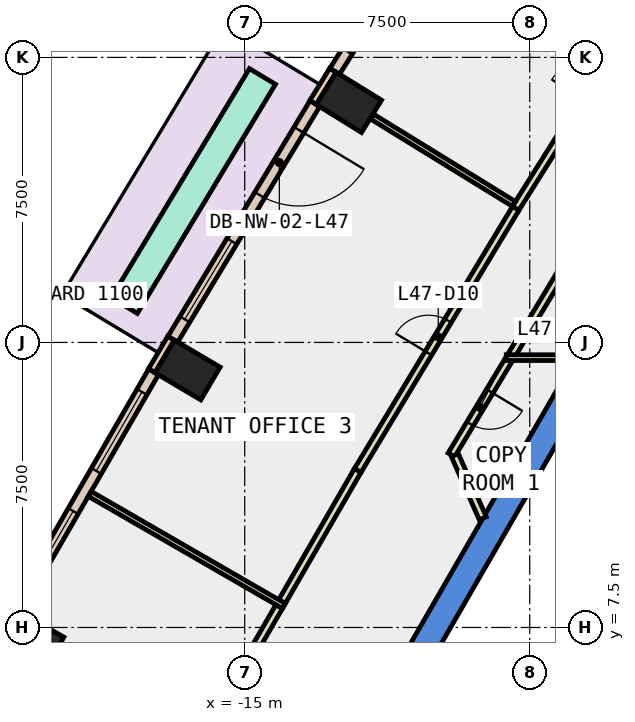
"""IFC4 building model, lengths in metres.
Left out: names, types, materials, properties, quantities, classifications, styles, units other than length and angle.
Written with IfcOpenShell. Run it as: python <this file> out.ifc"""

import sys

from ifc_helpers import new_model, si_unit, direction, frame, frame_2d, origin, origin_2d, place, context, subcontext, project, spatial, polyline, rectangle, outline, extrude, element, fill, save


model = new_model("IFC4")
c1 = context("Model", 3, precision=1e-05, world=origin(), true_north=direction((0.0, 1.0)))
c2 = subcontext(c1, "Body", "Model", "MODEL_VIEW")
j1 = project(units=[si_unit("LENGTHUNIT", "METRE"), si_unit("PLANEANGLEUNIT", "RADIAN")], contexts=[c1])
p1 = place(None, origin())
s1 = spatial("IfcSite", under=j1, at=p1, CompositionType="ELEMENT")
p2 = place(p1, origin())
s2 = spatial("IfcBuilding", under=s1, at=p2, CompositionType="ELEMENT")
p3 = place(p2, frame((0.0, 0.0, 210.8)))
s3 = spatial("IfcBuildingStorey", under=s2, at=p3, CompositionType="ELEMENT", Elevation=210.8)
for number, where, z_axis, x_axis in (
    (1, (-12.259, 21.317, -0.4), (0.0, 0.0, 1.0), (0.525, 0.851, 0.0)),
    (2, (-16.504, 14.275, -0.4), (0.0, 0.0, 1.0), (0.509, 0.861, 0.0)),
    (3, (-20.615, 7.155, -0.4), (0.0, 0.0, 1.0), (0.491, 0.871, 0.0)),
):
    element("IfcColumn", number, at=place(p3, frame(where, z_axis=z_axis, x_axis=x_axis)), inside=s3, PredefinedType="COLUMN", context=c2, shape_type="SweptSolid", body=[
        extrude(rectangle(XDim=1.0, YDim=1.4, at=origin_2d()), origin(), (0.0, 0.0, 1.0), 4.2),
    ])
p4 = place(p3, frame((0.0, 0.0, -0.4)))
e4 = element("IfcWall", 4, at=p4, inside=s3, PredefinedType="SHEAR", context=c2, shape_type="SweptSolid", body=[
    extrude(outline(polyline([(-11.834, 5.002), (-11.228, 4.652), (-6.235, 13.3), (-6.64, 14.0), (-11.834, 5.002)])), origin(), (0.0, 0.0, 1.0), 4.2),
])
p5 = place(p3, frame((-12.677, 22.163, 0.0), z_axis=(0.0, 0.0, 1.0), x_axis=(-0.525648735675, -0.850701714282, 0.0)))
e5 = element("IfcWall", 5, at=p5, inside=s3, PredefinedType="STANDARD", context=c2, shape_type="SweptSolid", body=[
    extrude(rectangle(XDim=1.0, YDim=0.2, at=frame_2d((0.5, 0.0))), origin(), (0.0, 0.0, 1.0), 3.8),
])
p6 = place(p3, frame((-16.939, 15.113, 0.0), z_axis=(0.0, 0.0, 1.0), x_axis=(-0.508161541526, -0.861261776531, 0.0)))
e6 = element("IfcWall", 6, at=p6, inside=s3, PredefinedType="STANDARD", context=c2, shape_type="SweptSolid", body=[
    extrude(rectangle(XDim=1.0, YDim=0.2, at=frame_2d((0.5, 0.0))), origin(), (0.0, 0.0, 1.0), 3.8),
])
p7 = place(p3, frame((-8.759, 28.29, 0.0), z_axis=(0.0, 0.0, 1.0), x_axis=(-0.532522107002, -0.84641609481, 0.0)))
e7 = element("IfcWall", 7, at=p7, inside=s3, PredefinedType="STANDARD", context=c2, shape_type="SweptSolid", body=[
    extrude(rectangle(XDim=7.273, YDim=0.3, at=frame_2d((3.636, 0.0))), origin(), (0.0, 0.0, 1.0), 3.8),
])
p8 = place(p7, frame((0.618, 0.0, 0.9)))
e8 = element("IfcOpeningElement", 8, at=p8, cuts=e7, PredefinedType="OPENING", context=c2, shape_type="SweptSolid", body=[
    extrude(rectangle(XDim=2.4, YDim=2.6, at=frame_2d((1.2, 1.3))), frame((0.0, 0.16, 0.0), z_axis=(0.0, -1.0, 0.0), x_axis=(1.0, 0.0, 0.0)), (0.0, 0.0, 1.0), 0.32),
])
p9 = place(p7, frame((4.255, 0.0, 0.9)))
e9 = element("IfcOpeningElement", 9, at=p9, cuts=e7, PredefinedType="OPENING", context=c2, shape_type="SweptSolid", body=[
    extrude(rectangle(XDim=2.4, YDim=2.6, at=frame_2d((1.2, 1.3))), frame((0.0, 0.16, 0.0), z_axis=(0.0, -1.0, 0.0), x_axis=(1.0, 0.0, 0.0)), (0.0, 0.0, 1.0), 0.32),
])
p10 = place(p3, frame((-13.155, 21.284, 0.0), z_axis=(0.0, 0.0, 1.0), x_axis=(-0.516230553484, -0.856449657394, 0.0)))
e10 = element("IfcWall", 10, at=p10, inside=s3, PredefinedType="STANDARD", context=c2, shape_type="SweptSolid", body=[
    extrude(rectangle(XDim=7.239, YDim=0.3, at=frame_2d((3.62, 0.0))), origin(), (0.0, 0.0, 1.0), 3.8),
])
p11 = place(p10, frame((0.81, 0.0, 0.0)))
e11 = element("IfcOpeningElement", 11, at=p11, cuts=e10, PredefinedType="OPENING", context=c2, shape_type="SweptSolid", body=[
    extrude(rectangle(XDim=2.0, YDim=2.4, at=frame_2d((1.0, 1.2))), frame((0.0, 0.16, 0.0), z_axis=(0.0, -1.0, 0.0), x_axis=(1.0, 0.0, 0.0)), (0.0, 0.0, 1.0), 0.32),
])
p12 = place(p10, frame((4.229, 0.0, 0.9)))
e12 = element("IfcOpeningElement", 12, at=p12, cuts=e10, PredefinedType="OPENING", context=c2, shape_type="SweptSolid", body=[
    extrude(rectangle(XDim=2.4, YDim=2.6, at=frame_2d((1.2, 1.3))), frame((0.0, 0.16, 0.0), z_axis=(0.0, -1.0, 0.0), x_axis=(1.0, 0.0, 0.0)), (0.0, 0.0, 1.0), 0.32),
])
p13 = place(p3, frame((-17.399, 14.225, 0.0), z_axis=(0.0, 0.0, 1.0), x_axis=(-0.500012402131, -0.866018243292, 0.0)))
e13 = element("IfcWall", 13, at=p13, inside=s3, PredefinedType="STANDARD", context=c2, shape_type="SweptSolid", body=[
    extrude(rectangle(XDim=7.24, YDim=0.3, at=frame_2d((3.62, 0.0))), origin(), (0.0, 0.0, 1.0), 3.8),
])
p14 = place(p13, frame((0.61, 0.0, 0.9)))
e14 = element("IfcOpeningElement", 14, at=p14, cuts=e13, PredefinedType="OPENING", context=c2, shape_type="SweptSolid", body=[
    extrude(rectangle(XDim=2.4, YDim=2.6, at=frame_2d((1.2, 1.3))), frame((0.0, 0.16, 0.0), z_axis=(0.0, -1.0, 0.0), x_axis=(1.0, 0.0, 0.0)), (0.0, 0.0, 1.0), 0.32),
])
p15 = place(p13, frame((4.23, 0.0, 0.9)))
e15 = element("IfcOpeningElement", 15, at=p15, cuts=e13, PredefinedType="OPENING", context=c2, shape_type="SweptSolid", body=[
    extrude(rectangle(XDim=2.4, YDim=2.6, at=frame_2d((1.2, 1.3))), frame((0.0, 0.16, 0.0), z_axis=(0.0, -1.0, 0.0), x_axis=(1.0, 0.0, 0.0)), (0.0, 0.0, 1.0), 0.32),
])
p16 = place(p3, frame((-14.534, 21.999, 0.0), z_axis=(0.0, 0.0, 1.0), x_axis=(-0.516228760394, -0.856450738188, 0.0)))
e16 = element("IfcWall", 16, at=p16, inside=s3, PredefinedType="STANDARD", context=c2, shape_type="SweptSolid", body=[
    extrude(rectangle(XDim=7.04, YDim=0.8, at=frame_2d((3.52, 0.0))), origin(), (0.0, 0.0, 1.0), 0.8),
])
p17 = place(p3, frame((-8.057, 14.536, 0.0), z_axis=(0.0, 0.0, 1.0), x_axis=(-0.516268010323, -0.856427078926, 0.0)))
e17 = element("IfcWall", 17, at=p17, inside=s3, PredefinedType="PARTITIONING", context=c2, shape_type="SweptSolid", body=[
    extrude(rectangle(XDim=2.915, YDim=0.2, at=frame_2d((1.458, 0.0))), origin(), (0.0, 0.0, 1.0), 3.8),
])
p18 = place(p17, frame((0.958, 0.0, 0.0)))
e18 = element("IfcOpeningElement", 18, at=p18, cuts=e17, PredefinedType="OPENING", context=c2, shape_type="SweptSolid", body=[
    extrude(rectangle(XDim=1.0, YDim=2.1, at=frame_2d((0.5, 1.05))), frame((0.0, 0.11, 0.0), z_axis=(0.0, -1.0, 0.0), x_axis=(1.0, 0.0, 0.0)), (0.0, 0.0, 1.0), 0.22),
])
p19 = place(p3, frame((-9.47, 12.033, 0.0), z_axis=(0.0, 0.0, 1.0), x_axis=(0.40441741061, -0.914574522931, 0.0)))
e19 = element("IfcWall", 19, at=p19, inside=s3, PredefinedType="PARTITIONING", context=c2, shape_type="SweptSolid", body=[
    extrude(rectangle(XDim=1.817, YDim=0.2, at=frame_2d((0.909, 0.0))), origin(), (0.0, 0.0, 1.0), 3.8),
])
p20 = place(p3, frame((-6.213, 17.595, 0.0), z_axis=(0.0, 0.0, 1.0), x_axis=(-0.516121112316, -0.856515614231, 0.0)))
e20 = element("IfcWall", 20, at=p20, inside=s3, PredefinedType="PARTITIONING", context=c2, shape_type="SweptSolid", body=[
    extrude(rectangle(XDim=3.422, YDim=0.2, at=frame_2d((1.711, 0.0))), origin(), (0.0, 0.0, 1.0), 3.8),
])
p21 = place(p3, frame((-7.871, 18.528, 0.0), z_axis=(0.0, 0.0, 1.0), x_axis=(0.532587642146, 0.846374859878, 0.0)))
e21 = element("IfcWall", 21, at=p21, inside=s3, PredefinedType="PARTITIONING", context=c2, shape_type="SweptSolid", body=[
    extrude(rectangle(XDim=7.749, YDim=0.2, at=frame_2d((3.875, 0.0))), origin(), (0.0, 0.0, 1.0), 3.8),
])
p22 = place(p21, frame((3.375, 0.0, 0.0)))
e22 = element("IfcOpeningElement", 22, at=p22, cuts=e21, PredefinedType="OPENING", context=c2, shape_type="SweptSolid", body=[
    extrude(rectangle(XDim=1.0, YDim=2.1, at=frame_2d((0.5, 1.05))), frame((0.0, 0.11, 0.0), z_axis=(0.0, -1.0, 0.0), x_axis=(1.0, 0.0, 0.0)), (0.0, 0.0, 1.0), 0.22),
])
p23 = place(p3, frame((-14.019, 8.18, 0.0), z_axis=(0.0, 0.0, 1.0), x_axis=(0.500089897431, 0.865973495257, 0.0)))
e23 = element("IfcWall", 23, at=p23, inside=s3, PredefinedType="PARTITIONING", context=c2, shape_type="SweptSolid", body=[
    extrude(rectangle(XDim=3.988, YDim=0.2, at=frame_2d((1.994, 0.0))), origin(), (0.0, 0.0, 1.0), 3.8),
])
p24 = place(p3, frame((-12.025, 11.633, 0.0), z_axis=(0.0, 0.0, 1.0), x_axis=(0.516283129542, 0.856417964636, 0.0)))
e24 = element("IfcWall", 24, at=p24, inside=s3, PredefinedType="PARTITIONING", context=c2, shape_type="SweptSolid", body=[
    extrude(rectangle(XDim=8.05, YDim=0.2, at=frame_2d((4.025, 0.0))), origin(), (0.0, 0.0, 1.0), 3.8),
])
p25 = place(p24, frame((3.6, 0.0, 0.0)))
e25 = element("IfcOpeningElement", 25, at=p25, cuts=e24, PredefinedType="OPENING", context=c2, shape_type="SweptSolid", body=[
    extrude(rectangle(XDim=1.0, YDim=2.1, at=frame_2d((0.5, 1.05))), frame((0.0, 0.11, 0.0), z_axis=(0.0, -1.0, 0.0), x_axis=(1.0, 0.0, 0.0)), (0.0, 0.0, 1.0), 0.22),
])
p26 = place(p3, frame((-16.087, 4.597, 0.0), z_axis=(0.0, 0.0, 1.0), x_axis=(0.499860276602, 0.866106058099, 0.0)))
e26 = element("IfcWall", 26, at=p26, inside=s3, PredefinedType="PARTITIONING", context=c2, shape_type="SweptSolid", body=[
    extrude(rectangle(XDim=3.987, YDim=0.2, at=frame_2d((1.994, 0.0))), origin(), (0.0, 0.0, 1.0), 3.8),
])
p27 = place(p26, frame((1.494, 0.0, 0.0)))
e27 = element("IfcOpeningElement", 27, at=p27, cuts=e26, PredefinedType="OPENING", context=c2, shape_type="SweptSolid", body=[
    extrude(rectangle(XDim=1.0, YDim=2.1, at=frame_2d((0.5, 1.05))), frame((0.0, 0.11, 0.0), z_axis=(0.0, -1.0, 0.0), x_axis=(1.0, 0.0, 0.0)), (0.0, 0.0, 1.0), 0.22),
])
p28 = place(p3, frame((-4.316, 14.6, 0.0), z_axis=(0.0, 0.0, 1.0), x_axis=(-1.0, 0.0, 0.0)))
e28 = element("IfcWall", 28, at=p28, inside=s3, PredefinedType="PARTITIONING", context=c2, shape_type="SweptSolid", body=[
    extrude(rectangle(XDim=3.802, YDim=0.15, at=frame_2d((1.901, 0.0))), origin(), (0.0, 0.0, 1.0), 3.8),
])
p29 = place(p3, frame((-7.916, 18.644, 0.0), z_axis=(0.0, 0.0, 1.0), x_axis=(-0.851543444049, 0.524284047914, 0.0)))
e29 = element("IfcWall", 29, at=p29, inside=s3, PredefinedType="PARTITIONING", context=c2, shape_type="SweptSolid", body=[
    extrude(rectangle(XDim=4.379, YDim=0.15, at=frame_2d((2.189, 0.0))), origin(), (0.0, 0.0, 1.0), 3.8),
])
p30 = place(p3, frame((-13.97, 8.065, 0.0), z_axis=(0.0, 0.0, 1.0), x_axis=(-0.866011230889, 0.500024547371, 0.0)))
e30 = element("IfcWall", 30, at=p30, inside=s3, PredefinedType="PARTITIONING", context=c2, shape_type="SweptSolid", body=[
    extrude(rectangle(XDim=5.9, YDim=0.15, at=frame_2d((2.95, 0.0))), origin(), (0.0, 0.0, 1.0), 3.8),
])
p31 = place(p3, frame((-5.03, 9.388, 0.0), z_axis=(0.0, 0.0, 1.0), x_axis=(-0.499978703459, -0.866037698999, 0.0)))
e31 = element("IfcWall", 31, at=p31, inside=s3, PredefinedType="STANDARD", context=c2, shape_type="SweptSolid", body=[
    extrude(rectangle(XDim=6.9, YDim=0.2, at=frame_2d((3.45, 0.0))), origin(), (0.0, 0.0, 1.0), 3.8),
])
p32 = place(p11, origin())
e32 = element("IfcDoor", 32, at=p32, inside=s3, OperationType="SLIDING_TO_LEFT", PredefinedType="DOOR", context=c2, shape_type="SweptSolid", body=[
    extrude(rectangle(XDim=2.0, YDim=2.4, at=frame_2d((1.0, 1.2))), frame((0.0, 0.025, 0.0), z_axis=(0.0, -1.0, 0.0), x_axis=(1.0, 0.0, 0.0)), (0.0, 0.0, 1.0), 0.05),
])
fill(e11, e32)
p33 = place(p12, origin())
e33 = element("IfcWindow", 33, at=p33, inside=s3, PartitioningType="SINGLE_PANEL", PredefinedType="WINDOW", context=c2, shape_type="SweptSolid", body=[
    extrude(rectangle(XDim=2.4, YDim=2.6, at=frame_2d((1.2, 1.3))), frame((0.0, 0.03, 0.0), z_axis=(0.0, -1.0, 0.0), x_axis=(1.0, 0.0, 0.0)), (0.0, 0.0, 1.0), 0.06),
])
fill(e12, e33)
p34 = place(p14, origin())
e34 = element("IfcWindow", 34, at=p34, inside=s3, PartitioningType="SINGLE_PANEL", PredefinedType="WINDOW", context=c2, shape_type="SweptSolid", body=[
    extrude(rectangle(XDim=2.4, YDim=2.6, at=frame_2d((1.2, 1.3))), frame((0.0, 0.03, 0.0), z_axis=(0.0, -1.0, 0.0), x_axis=(1.0, 0.0, 0.0)), (0.0, 0.0, 1.0), 0.06),
])
fill(e14, e34)
p35 = place(p15, origin())
e35 = element("IfcWindow", 35, at=p35, inside=s3, PartitioningType="SINGLE_PANEL", PredefinedType="WINDOW", context=c2, shape_type="SweptSolid", body=[
    extrude(rectangle(XDim=2.4, YDim=2.6, at=frame_2d((1.2, 1.3))), frame((0.0, 0.03, 0.0), z_axis=(0.0, -1.0, 0.0), x_axis=(1.0, 0.0, 0.0)), (0.0, 0.0, 1.0), 0.06),
])
fill(e15, e35)
p36 = place(p25, origin())
e36 = element("IfcDoor", 36, at=p36, inside=s3, OperationType="SINGLE_SWING_LEFT", PredefinedType="DOOR", context=c2, shape_type="SweptSolid", body=[
    extrude(rectangle(XDim=1.0, YDim=2.1, at=frame_2d((0.5, 1.05))), frame((0.0, 0.025, 0.0), z_axis=(0.0, -1.0, 0.0), x_axis=(1.0, 0.0, 0.0)), (0.0, 0.0, 1.0), 0.05),
])
fill(e25, e36)
p37 = place(p18, origin())
e37 = element("IfcDoor", 37, at=p37, inside=s3, OperationType="SINGLE_SWING_LEFT", PredefinedType="DOOR", context=c2, shape_type="SweptSolid", body=[
    extrude(rectangle(XDim=1.0, YDim=2.1, at=frame_2d((0.5, 1.05))), frame((0.0, 0.025, 0.0), z_axis=(0.0, -1.0, 0.0), x_axis=(1.0, 0.0, 0.0)), (0.0, 0.0, 1.0), 0.05),
])
fill(e18, e37)
save(model, sys.argv[1])
